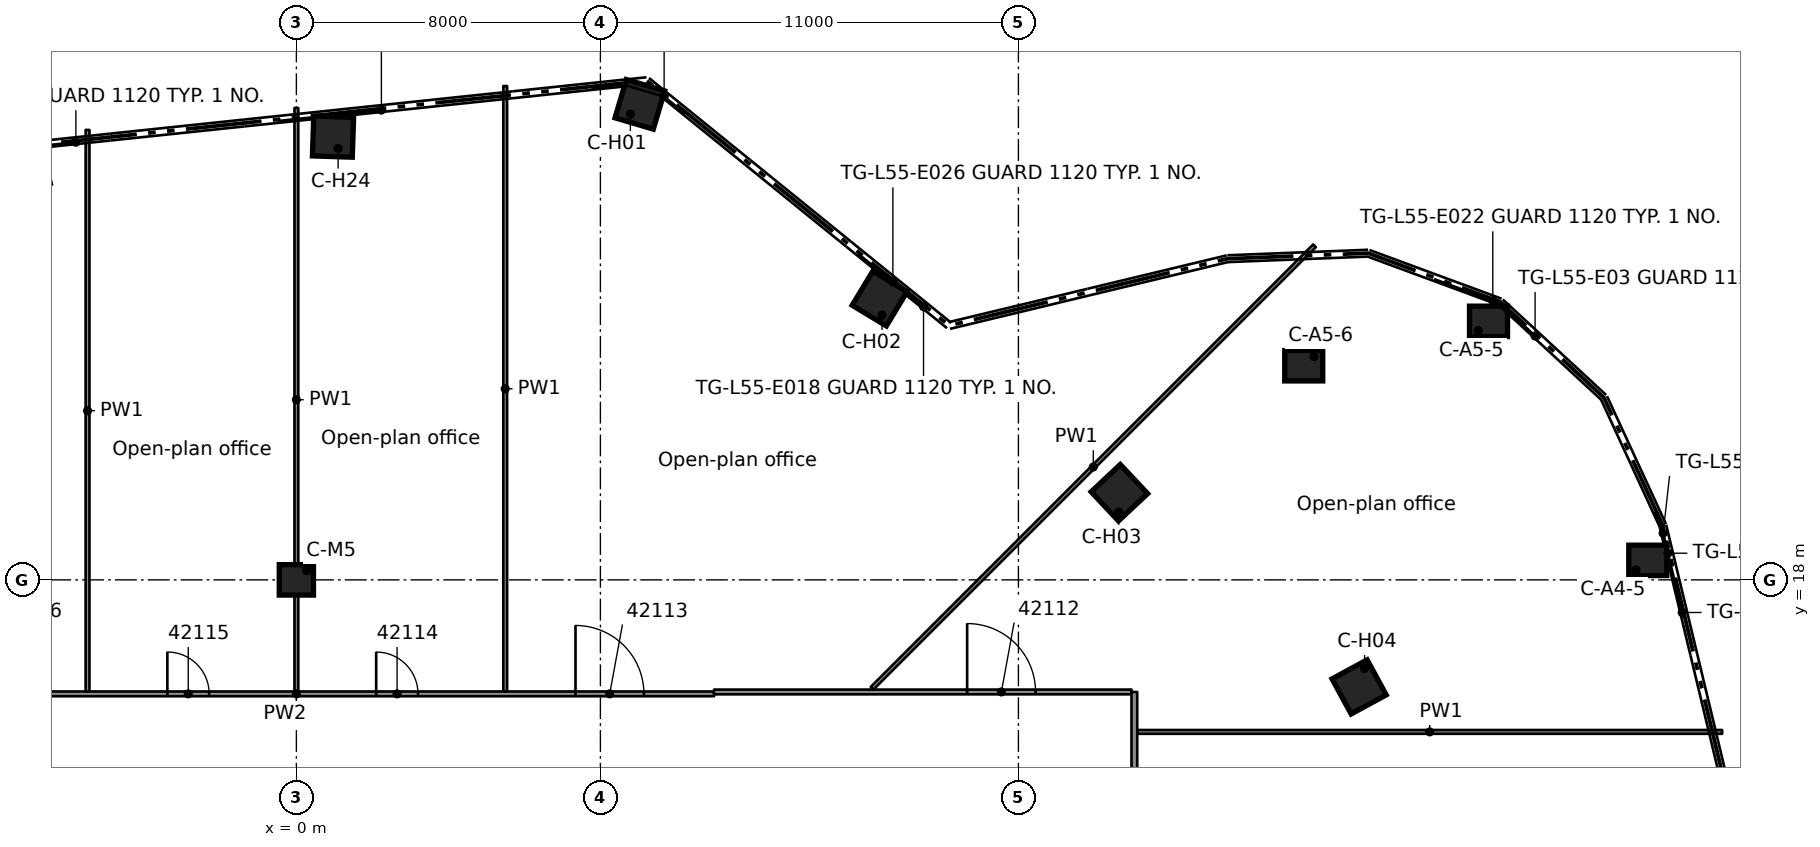
"""IFC4 building model, lengths in metres.
Left out: names, types, materials, properties, quantities, classifications, styles, units other than length and angle.
Written with IfcOpenShell. Run it as: python <this file> out.ifc"""

import sys

from ifc_helpers import new_model, si_unit, direction, frame, frame_2d, origin, origin_2d, place, context, subcontext, project, spatial, rectangle, extrude, element, fill, save


model = new_model("IFC4")
c1 = context("Model", 3, precision=1e-05, world=origin(), true_north=direction((0.0, 1.0)))
c2 = subcontext(c1, "Body", "Model", "MODEL_VIEW")
j1 = project(units=[si_unit("LENGTHUNIT", "METRE"), si_unit("PLANEANGLEUNIT", "RADIAN")], contexts=[c1])
p1 = place(None, origin())
s1 = spatial("IfcSite", under=j1, at=p1, CompositionType="ELEMENT")
p2 = place(p1, origin())
s2 = spatial("IfcBuilding", under=s1, at=p2, CompositionType="ELEMENT")
p3 = place(p2, frame((0.0, 0.0, 210.5)))
s3 = spatial("IfcBuildingStorey", under=s2, at=p3, CompositionType="ELEMENT", Elevation=210.5)
for number, where, z_axis, x_axis in (
    (1, (35.561, 18.513, 0.0), (0.0, 0.0, 1.0), (1.0, 0.0, 0.0)),
    (2, (31.37, 24.802, 0.0), (0.0, 0.0, 1.0), (1.0, 0.0, 0.0)),
    (3, (26.508, 23.635, 0.0), (0.0, 0.0, 1.0), (1.0, 0.0, 0.0)),
):
    element("IfcColumn", number, at=place(p3, frame(where, z_axis=z_axis, x_axis=x_axis)), inside=s3, PredefinedType="COLUMN", context=c2, shape_type="SweptSolid", body=[
        extrude(rectangle(XDim=1.0, YDim=0.8, at=origin_2d()), origin(), (0.0, 0.0, 1.0), 3.5),
    ])
for number, where, z_axis, x_axis in (
    (4, (9.038, 30.512, 0.0), (0.0, 0.0, 1.0), (0.284, 0.959, 0.0)),
    (5, (15.347, 25.403, 0.0), (0.0, 0.0, 1.0), (0.517, 0.856, 0.0)),
    (6, (21.657, 20.293, 0.0), (0.0, 0.0, 1.0), (0.73, 0.684, 0.0)),
    (7, (27.966, 15.184, 0.0), (0.0, 0.0, 1.0), (0.879, 0.477, 0.0)),
    (8, (0.964, 29.663, 0.0), (0.0, 0.0, 1.0), (0.032, 0.999, 0.0)),
):
    element("IfcColumn", number, at=place(p3, frame(where, z_axis=z_axis, x_axis=x_axis)), inside=s3, PredefinedType="COLUMN", context=c2, shape_type="SweptSolid", body=[
        extrude(rectangle(XDim=1.05, YDim=1.05, at=origin_2d()), origin(), (0.0, 0.0, 1.0), 3.5),
    ])
p4 = place(p3, frame((0.0, 18.0, 0.0), z_axis=(0.0, 0.0, 1.0), x_axis=(1.0, 0.0, 0.0)))
e9 = element("IfcColumn", 9, at=p4, inside=s3, PredefinedType="COLUMN", context=c2, shape_type="SweptSolid", body=[
    extrude(rectangle(XDim=0.9, YDim=0.8, at=origin_2d()), origin(), (0.0, 0.0, 1.0), 3.5),
])
p5 = place(p3, frame((22.126, 14.0, 0.0), z_axis=(0.0, 0.0, 1.0), x_axis=(1.0, 0.0, 0.0)))
e10 = element("IfcWall", 10, at=p5, inside=s3, PredefinedType="PARTITIONING", context=c2, shape_type="SweptSolid", body=[
    extrude(rectangle(XDim=15.392, YDim=0.1, at=frame_2d((7.696, 0.0))), origin(), (0.0, 0.0, 1.0), 3.08),
])
p6 = place(p3, frame((-10.99, 15.001, 0.0), z_axis=(0.0, 0.0, 1.0), x_axis=(1.0, 0.0, 0.0)))
e11 = element("IfcWall", 11, at=p6, inside=s3, PredefinedType="PARTITIONING", context=c2, shape_type="SweptSolid", body=[
    extrude(rectangle(XDim=21.98, YDim=0.125, at=frame_2d((10.99, 0.0))), origin(), (0.0, 0.0, 1.0), 3.08),
])
p7 = place(p6, frame((18.335, 0.0, 0.0)))
e12 = element("IfcOpeningElement", 12, at=p7, cuts=e11, PredefinedType="OPENING", context=c2, shape_type="SweptSolid", body=[
    extrude(rectangle(XDim=1.8, YDim=2.1, at=frame_2d((0.9, 1.05))), frame((0.0, 0.073, 0.0), z_axis=(0.0, -1.0, 0.0), x_axis=(1.0, 0.0, 0.0)), (0.0, 0.0, 1.0), 0.145),
])
p8 = place(p6, frame((13.09, 0.0, 0.0)))
e13 = element("IfcOpeningElement", 13, at=p8, cuts=e11, PredefinedType="OPENING", context=c2, shape_type="SweptSolid", body=[
    extrude(rectangle(XDim=1.1, YDim=2.1, at=frame_2d((0.55, 1.05))), frame((0.0, 0.073, 0.0), z_axis=(0.0, -1.0, 0.0), x_axis=(1.0, 0.0, 0.0)), (0.0, 0.0, 1.0), 0.145),
])
p9 = place(p6, frame((7.595, 0.0, 0.0)))
e14 = element("IfcOpeningElement", 14, at=p9, cuts=e11, PredefinedType="OPENING", context=c2, shape_type="SweptSolid", body=[
    extrude(rectangle(XDim=1.1, YDim=2.1, at=frame_2d((0.55, 1.05))), frame((0.0, 0.073, 0.0), z_axis=(0.0, -1.0, 0.0), x_axis=(1.0, 0.0, 0.0)), (0.0, 0.0, 1.0), 0.145),
])
p10 = place(p6, frame((1.85, 0.0, 0.0)))
e15 = element("IfcOpeningElement", 15, at=p10, cuts=e11, PredefinedType="OPENING", context=c2, shape_type="SweptSolid", body=[
    extrude(rectangle(XDim=1.8, YDim=2.1, at=frame_2d((0.9, 1.05))), frame((0.0, 0.073, 0.0), z_axis=(0.0, -1.0, 0.0), x_axis=(1.0, 0.0, 0.0)), (0.0, 0.0, 1.0), 0.145),
])
p11 = place(p3, frame((10.991, 15.051, 0.0), z_axis=(0.0, 0.0, 1.0), x_axis=(1.0, 0.0, 0.0)))
e16 = element("IfcWall", 16, at=p11, inside=s3, PredefinedType="PARTITIONING", context=c2, shape_type="SweptSolid", body=[
    extrude(rectangle(XDim=10.984, YDim=0.125, at=frame_2d((5.492, 0.0))), origin(), (0.0, 0.0, 1.0), 3.08),
])
p12 = place(p11, frame((6.66, 0.0, 0.0)))
e17 = element("IfcOpeningElement", 17, at=p12, cuts=e16, PredefinedType="OPENING", context=c2, shape_type="SweptSolid", body=[
    extrude(rectangle(XDim=1.8, YDim=2.1, at=frame_2d((0.9, 1.05))), frame((0.0, 0.073, 0.0), z_axis=(0.0, -1.0, 0.0), x_axis=(1.0, 0.0, 0.0)), (0.0, 0.0, 1.0), 0.145),
])
p13 = place(p3, frame((15.149, 15.149, 0.0), z_axis=(0.0, 0.0, 1.0), x_axis=(0.707106781187, 0.707106781187, 0.0)))
e18 = element("IfcWall", 18, at=p13, inside=s3, PredefinedType="PARTITIONING", context=c2, shape_type="SweptSolid", body=[
    extrude(rectangle(XDim=16.464, YDim=0.1, at=frame_2d((8.232, 0.0))), origin(), (0.0, 0.0, 1.0), 3.08),
])
p14 = place(p3, frame((22.051, 15.05, 0.0), z_axis=(0.0, 0.0, 1.0), x_axis=(0.0, -1.0, 0.0)))
e19 = element("IfcWall", 19, at=p14, inside=s3, PredefinedType="PARTITIONING", context=c2, shape_type="SweptSolid", body=[
    extrude(rectangle(XDim=30.1, YDim=0.15, at=frame_2d((15.05, 0.0))), origin(), (0.0, 0.0, 1.0), 3.08),
])
p15 = place(p14, frame((24.9, 0.0, 0.0)))
e20 = element("IfcOpeningElement", 20, at=p15, cuts=e19, PredefinedType="OPENING", context=c2, shape_type="SweptSolid", body=[
    extrude(rectangle(XDim=1.1, YDim=2.1, at=frame_2d((0.55, 1.05))), frame((0.0, 0.085, 0.0), z_axis=(0.0, -1.0, 0.0), x_axis=(1.0, 0.0, 0.0)), (0.0, 0.0, 1.0), 0.17),
])
p16 = place(p14, frame((17.65, 0.0, 0.0)))
e21 = element("IfcOpeningElement", 21, at=p16, cuts=e19, PredefinedType="OPENING", context=c2, shape_type="SweptSolid", body=[
    extrude(rectangle(XDim=1.8, YDim=2.1, at=frame_2d((0.9, 1.05))), frame((0.0, 0.085, 0.0), z_axis=(0.0, -1.0, 0.0), x_axis=(1.0, 0.0, 0.0)), (0.0, 0.0, 1.0), 0.17),
])
p17 = place(p14, frame((10.65, 0.0, 0.0)))
e22 = element("IfcOpeningElement", 22, at=p17, cuts=e19, PredefinedType="OPENING", context=c2, shape_type="SweptSolid", body=[
    extrude(rectangle(XDim=1.8, YDim=2.1, at=frame_2d((0.9, 1.05))), frame((0.0, 0.085, 0.0), z_axis=(0.0, -1.0, 0.0), x_axis=(1.0, 0.0, 0.0)), (0.0, 0.0, 1.0), 0.17),
])
p18 = place(p14, frame((3.9, 0.0, 0.0)))
e23 = element("IfcOpeningElement", 23, at=p18, cuts=e19, PredefinedType="OPENING", context=c2, shape_type="SweptSolid", body=[
    extrude(rectangle(XDim=1.1, YDim=2.1, at=frame_2d((0.55, 1.05))), frame((0.0, 0.085, 0.0), z_axis=(0.0, -1.0, 0.0), x_axis=(1.0, 0.0, 0.0)), (0.0, 0.0, 1.0), 0.17),
])
p19 = place(p3, frame((5.495, 15.063, 0.0), z_axis=(0.0, 0.0, 1.0), x_axis=(0.0, 1.0, 0.0)))
e24 = element("IfcWall", 24, at=p19, inside=s3, PredefinedType="PARTITIONING", context=c2, shape_type="SweptSolid", body=[
    extrude(rectangle(XDim=15.931, YDim=0.1, at=frame_2d((7.965, 0.0))), origin(), (0.0, 0.0, 1.0), 3.08),
])
p20 = place(p3, frame((0.0, 15.063, 0.0), z_axis=(0.0, 0.0, 1.0), x_axis=(0.0, 1.0, 0.0)))
e25 = element("IfcWall", 25, at=p20, inside=s3, PredefinedType="PARTITIONING", context=c2, shape_type="SweptSolid", body=[
    extrude(rectangle(XDim=15.354, YDim=0.1, at=frame_2d((7.677, 0.0))), origin(), (0.0, 0.0, 1.0), 3.08),
])
p21 = place(p3, frame((-5.495, 15.063, 0.0), z_axis=(0.0, 0.0, 1.0), x_axis=(0.0, 1.0, 0.0)))
e26 = element("IfcWall", 26, at=p21, inside=s3, PredefinedType="PARTITIONING", context=c2, shape_type="SweptSolid", body=[
    extrude(rectangle(XDim=14.776, YDim=0.1, at=frame_2d((7.388, 0.0))), origin(), (0.0, 0.0, 1.0), 3.08),
])
p22 = place(p12, origin())
e27 = element("IfcDoor", 27, at=p22, inside=s3, OperationType="DOUBLE_DOOR_SINGLE_SWING", PredefinedType="DOOR", context=c2, shape_type="SweptSolid", body=[
    extrude(rectangle(XDim=1.8, YDim=2.1, at=frame_2d((0.9, 1.05))), frame((0.0, 0.025, 0.0), z_axis=(0.0, -1.0, 0.0), x_axis=(1.0, 0.0, 0.0)), (0.0, 0.0, 1.0), 0.05),
])
fill(e17, e27)
p23 = place(p7, origin())
e28 = element("IfcDoor", 28, at=p23, inside=s3, OperationType="DOUBLE_DOOR_SINGLE_SWING", PredefinedType="DOOR", context=c2, shape_type="SweptSolid", body=[
    extrude(rectangle(XDim=1.8, YDim=2.1, at=frame_2d((0.9, 1.05))), frame((0.0, 0.025, 0.0), z_axis=(0.0, -1.0, 0.0), x_axis=(1.0, 0.0, 0.0)), (0.0, 0.0, 1.0), 0.05),
])
fill(e12, e28)
p24 = place(p8, origin())
e29 = element("IfcDoor", 29, at=p24, inside=s3, OperationType="SINGLE_SWING_RIGHT", PredefinedType="DOOR", context=c2, shape_type="SweptSolid", body=[
    extrude(rectangle(XDim=1.1, YDim=2.1, at=frame_2d((0.55, 1.05))), frame((0.0, 0.025, 0.0), z_axis=(0.0, -1.0, 0.0), x_axis=(1.0, 0.0, 0.0)), (0.0, 0.0, 1.0), 0.05),
])
fill(e13, e29)
p25 = place(p9, origin())
e30 = element("IfcDoor", 30, at=p25, inside=s3, OperationType="SINGLE_SWING_LEFT", PredefinedType="DOOR", context=c2, shape_type="SweptSolid", body=[
    extrude(rectangle(XDim=1.1, YDim=2.1, at=frame_2d((0.55, 1.05))), frame((0.0, 0.025, 0.0), z_axis=(0.0, -1.0, 0.0), x_axis=(1.0, 0.0, 0.0)), (0.0, 0.0, 1.0), 0.05),
])
fill(e14, e30)
save(model, sys.argv[1])
